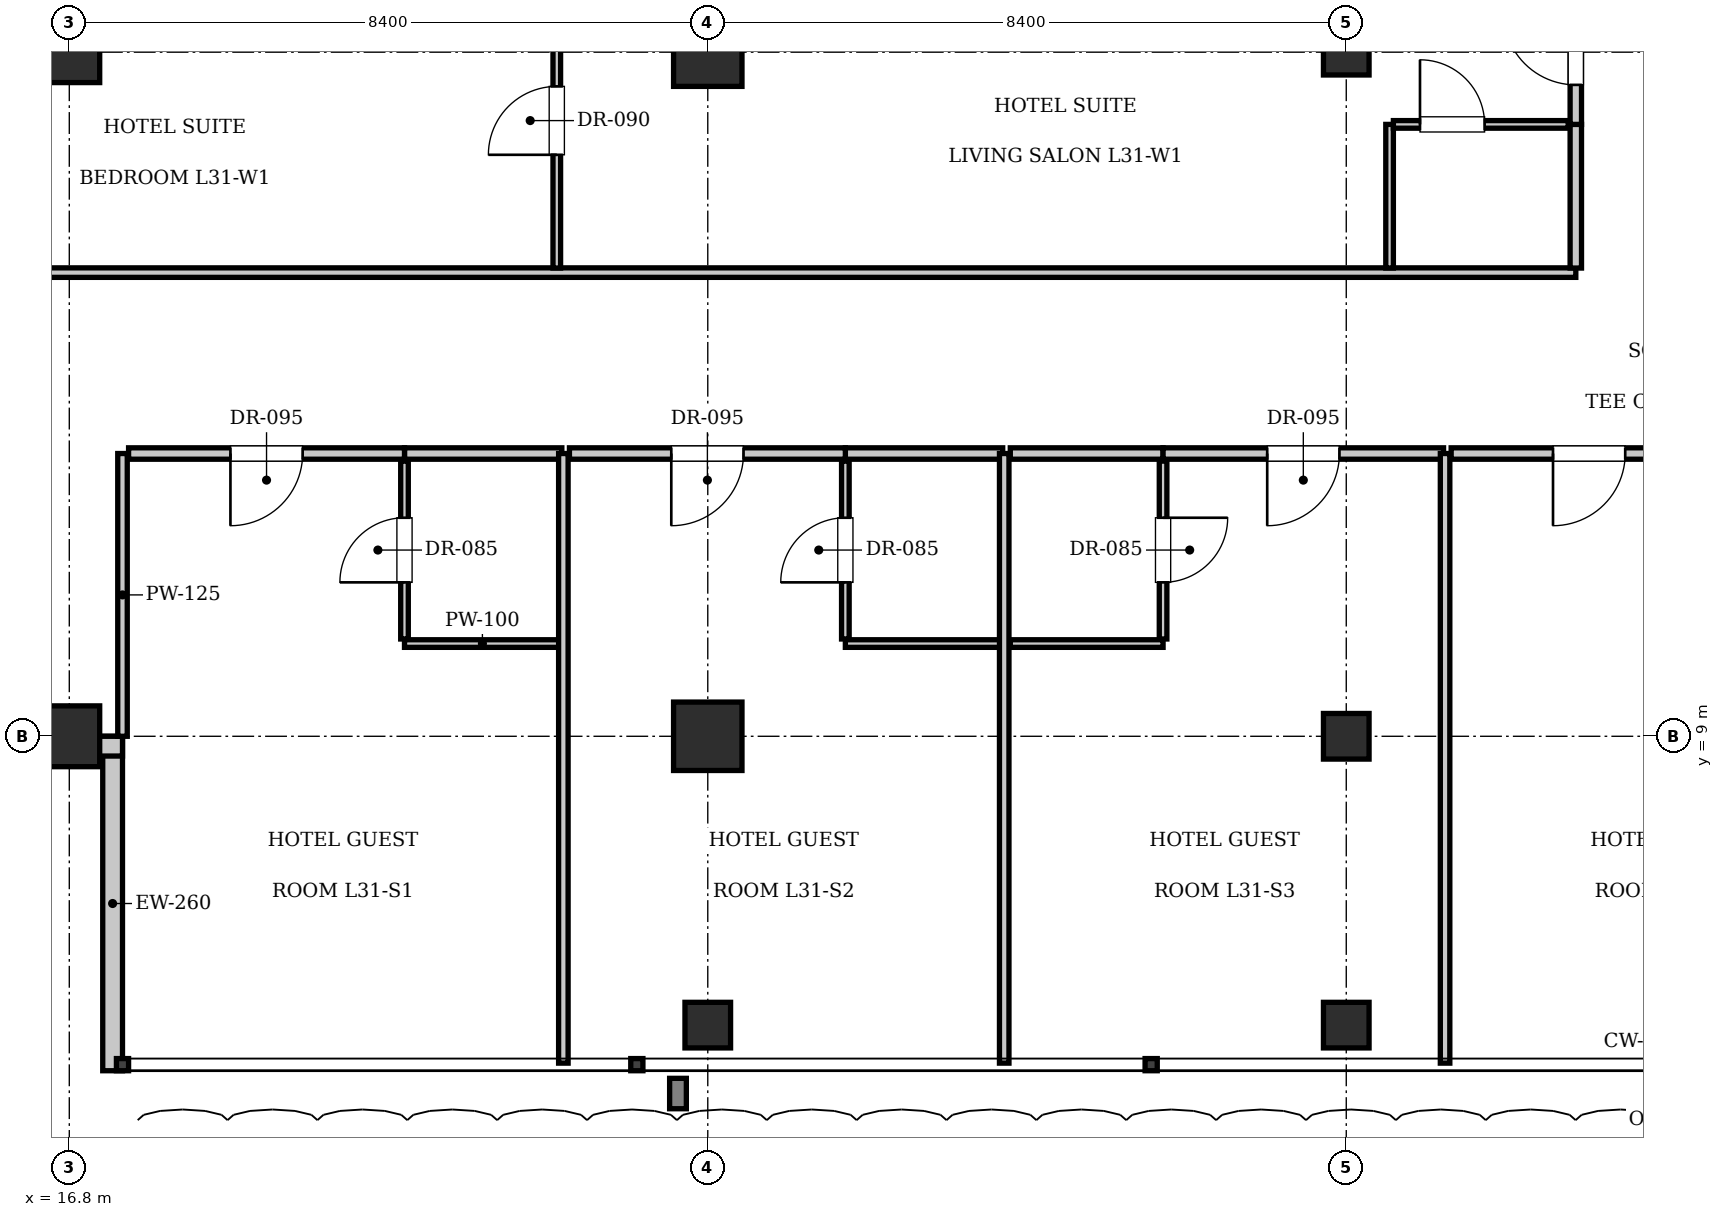
"""IFC4 building model, lengths in metres.
Left out: names, types, materials, properties, quantities, classifications, styles, units other than length and angle.
Written with IfcOpenShell. Run it as: python <this file> out.ifc"""

import sys

from ifc_helpers import new_model, si_unit, direction, frame, frame_2d, origin, origin_2d, place, context, subcontext, project, spatial, rectangle, i_section, extrude, element, fill, save


model = new_model("IFC4")
c1 = context("Model", 3, precision=1e-05, world=origin(), true_north=direction((0.0, 1.0)))
c2 = subcontext(c1, "Body", "Model", "MODEL_VIEW")
j1 = project(units=[si_unit("LENGTHUNIT", "METRE"), si_unit("PLANEANGLEUNIT", "RADIAN")], contexts=[c1])
p1 = place(None, origin())
s1 = spatial("IfcSite", under=j1, at=p1, CompositionType="ELEMENT")
p2 = place(p1, origin())
s2 = spatial("IfcBuilding", under=s1, at=p2, CompositionType="ELEMENT")
p3 = place(p2, frame((0.0, 0.0, 131.25)))
s3 = spatial("IfcBuildingStorey", under=s2, at=p3, CompositionType="ELEMENT", Elevation=131.25)
for number, where, z_axis, x_axis in (
    (1, (25.2, 18.0, 0.0), (0.0, 0.0, 1.0), (1.0, 0.0, 0.0)),
    (2, (25.2, 9.0, 0.0), (0.0, 0.0, 1.0), (1.0, 0.0, 0.0)),
):
    element("IfcColumn", number, at=place(p3, frame(where, z_axis=z_axis, x_axis=x_axis)), inside=s3, PredefinedType="COLUMN", context=c2, shape_type="SweptSolid", body=[
        extrude(rectangle(XDim=0.9, YDim=0.9, at=origin_2d()), origin(), (0.0, 0.0, 1.0), 3.85),
    ])
for number, where, z_axis, x_axis in (
    (3, (33.6, 9.0, 0.0), (0.0, 0.0, 1.0), (1.0, 0.0, 0.0)),
    (4, (33.6, 18.0, 0.0), (0.0, 0.0, 1.0), (1.0, 0.0, 0.0)),
):
    element("IfcColumn", number, at=place(p3, frame(where, z_axis=z_axis, x_axis=x_axis)), inside=s3, PredefinedType="COLUMN", context=c2, shape_type="SweptSolid", body=[
        extrude(i_section(OverallWidth=0.6, OverallDepth=0.6, WebThickness=0.025, FlangeThickness=0.038, at=origin_2d()), origin(), (0.0, 0.0, 1.0), 3.85),
    ])
for number, where, z_axis, x_axis in (
    (5, (16.8, 9.0, 0.0), (0.0, 0.0, 1.0), (1.0, 0.0, 0.0)),
    (6, (16.8, 18.0, 0.0), (0.0, 0.0, 1.0), (1.0, 0.0, 0.0)),
):
    element("IfcColumn", number, at=place(p3, frame(where, z_axis=z_axis, x_axis=x_axis)), inside=s3, PredefinedType="COLUMN", context=c2, shape_type="SweptSolid", body=[
        extrude(rectangle(XDim=0.8, YDim=0.8, at=origin_2d()), origin(), (0.0, 0.0, 1.0), 3.85),
    ])
for number, where, z_axis, x_axis in (
    (7, (25.2, 5.2, 0.0), (0.0, 0.0, 1.0), (1.0, 0.0, 0.0)),
    (8, (33.6, 5.2, 0.0), (0.0, 0.0, 1.0), (1.0, 0.0, 0.0)),
):
    element("IfcColumn", number, at=place(p3, frame(where, z_axis=z_axis, x_axis=x_axis)), inside=s3, PredefinedType="COLUMN", context=c2, shape_type="SweptSolid", body=[
        extrude(i_section(OverallWidth=0.6, OverallDepth=0.6, WebThickness=0.025, FlangeThickness=0.038, at=origin_2d()), origin(), (0.0, 0.0, 1.0), 3.85),
    ])
p4 = place(p3, frame((17.37, 4.6, 0.0), z_axis=(0.0, 0.0, 1.0), x_axis=(0.0, 1.0, 0.0)))
e9 = element("IfcWall", 9, at=p4, inside=s3, PredefinedType="SOLIDWALL", context=c2, shape_type="SweptSolid", body=[
    extrude(rectangle(XDim=4.4, YDim=0.26, at=frame_2d((2.2, 0.0))), origin(), (0.0, 0.0, 1.0), 3.61),
])
p5 = place(p3, frame((17.5, 8.87, 0.0), z_axis=(0.0, 0.0, 1.0), x_axis=(-1.0, 0.0, 0.0)))
e10 = element("IfcWall", 10, at=p5, inside=s3, PredefinedType="SOLIDWALL", context=c2, shape_type="SweptSolid", body=[
    extrude(rectangle(XDim=4.4, YDim=0.26, at=frame_2d((2.2, 0.0))), origin(), (0.0, 0.0, 1.0), 2.998),
])
p6 = place(p3, frame((17.5, 9.0, 0.0), z_axis=(0.0, 0.0, 1.0), x_axis=(0.0, 1.0, 0.0)))
e11 = element("IfcWall", 11, at=p6, inside=s3, PredefinedType="PARTITIONING", context=c2, shape_type="SweptSolid", body=[
    extrude(rectangle(XDim=3.72, YDim=0.125, at=frame_2d((1.86, 0.0))), origin(), (0.0, 0.0, 1.0), 3.61),
])
p7 = place(p3, frame((21.21, 12.72, 0.0), z_axis=(0.0, 0.0, 1.0), x_axis=(1.0, 0.0, 0.0)))
e12 = element("IfcWall", 12, at=p7, inside=s3, PredefinedType="PARTITIONING", context=c2, shape_type="SweptSolid", body=[
    extrude(rectangle(XDim=2.07, YDim=0.15, at=frame_2d((1.035, 0.0))), origin(), (0.0, 0.0, 1.0), 3.61),
])
p8 = place(p3, frame((21.21, 10.22, 0.0), z_axis=(0.0, 0.0, 1.0), x_axis=(1.0, 0.0, 0.0)))
e13 = element("IfcWall", 13, at=p8, inside=s3, PredefinedType="PARTITIONING", context=c2, shape_type="SweptSolid", body=[
    extrude(rectangle(XDim=2.05, YDim=0.1, at=frame_2d((1.025, 0.0))), origin(), (0.0, 0.0, 1.0), 3.61),
])
p9 = place(p3, frame((21.21, 10.28, 0.0), z_axis=(0.0, 0.0, 1.0), x_axis=(0.0, 1.0, 0.0)))
e14 = element("IfcWall", 14, at=p9, inside=s3, PredefinedType="PARTITIONING", context=c2, shape_type="SweptSolid", body=[
    extrude(rectangle(XDim=2.34, YDim=0.1, at=frame_2d((1.17, 0.0))), origin(), (0.0, 0.0, 1.0), 3.61),
])
p10 = place(p9, frame((0.745, 0.0, 0.0)))
e15 = element("IfcOpeningElement", 15, at=p10, cuts=e14, PredefinedType="OPENING", context=c2, shape_type="SweptSolid", body=[
    extrude(rectangle(XDim=0.85, YDim=2.1, at=frame_2d((0.425, 1.05))), frame((0.0, 0.06, 0.0), z_axis=(0.0, -1.0, 0.0), x_axis=(1.0, 0.0, 0.0)), (0.0, 0.0, 1.0), 0.12),
])
p11 = place(p3, frame((17.58, 12.72, 0.0), z_axis=(0.0, 0.0, 1.0), x_axis=(1.0, 0.0, 0.0)))
e16 = element("IfcWall", 16, at=p11, inside=s3, PredefinedType="PARTITIONING", context=c2, shape_type="SweptSolid", body=[
    extrude(rectangle(XDim=3.63, YDim=0.15, at=frame_2d((1.815, 0.0))), origin(), (0.0, 0.0, 1.0), 3.61),
])
p12 = place(p11, frame((1.34, 0.0, 0.0)))
e17 = element("IfcOpeningElement", 17, at=p12, cuts=e16, PredefinedType="OPENING", context=c2, shape_type="SweptSolid", body=[
    extrude(rectangle(XDim=0.95, YDim=2.15, at=frame_2d((0.475, 1.075))), frame((0.0, 0.085, 0.0), z_axis=(0.0, -1.0, 0.0), x_axis=(1.0, 0.0, 0.0)), (0.0, 0.0, 1.0), 0.17),
])
p13 = place(p3, frame((23.3, 4.7, 0.0), z_axis=(0.0, 0.0, 1.0), x_axis=(0.0, 1.0, 0.0)))
e18 = element("IfcWall", 18, at=p13, inside=s3, PredefinedType="PARTITIONING", context=c2, shape_type="SweptSolid", body=[
    extrude(rectangle(XDim=8.02, YDim=0.125, at=frame_2d((4.01, 0.0))), origin(), (0.0, 0.0, 1.0), 3.61),
])
p14 = place(p3, frame((27.01, 12.72, 0.0), z_axis=(0.0, 0.0, 1.0), x_axis=(1.0, 0.0, 0.0)))
e19 = element("IfcWall", 19, at=p14, inside=s3, PredefinedType="PARTITIONING", context=c2, shape_type="SweptSolid", body=[
    extrude(rectangle(XDim=2.07, YDim=0.15, at=frame_2d((1.035, 0.0))), origin(), (0.0, 0.0, 1.0), 3.61),
])
p15 = place(p3, frame((27.01, 10.22, 0.0), z_axis=(0.0, 0.0, 1.0), x_axis=(1.0, 0.0, 0.0)))
e20 = element("IfcWall", 20, at=p15, inside=s3, PredefinedType="PARTITIONING", context=c2, shape_type="SweptSolid", body=[
    extrude(rectangle(XDim=2.05, YDim=0.1, at=frame_2d((1.025, 0.0))), origin(), (0.0, 0.0, 1.0), 3.61),
])
p16 = place(p3, frame((27.01, 10.28, 0.0), z_axis=(0.0, 0.0, 1.0), x_axis=(0.0, 1.0, 0.0)))
e21 = element("IfcWall", 21, at=p16, inside=s3, PredefinedType="PARTITIONING", context=c2, shape_type="SweptSolid", body=[
    extrude(rectangle(XDim=2.34, YDim=0.1, at=frame_2d((1.17, 0.0))), origin(), (0.0, 0.0, 1.0), 3.61),
])
p17 = place(p16, frame((0.745, 0.0, 0.0)))
e22 = element("IfcOpeningElement", 22, at=p17, cuts=e21, PredefinedType="OPENING", context=c2, shape_type="SweptSolid", body=[
    extrude(rectangle(XDim=0.85, YDim=2.1, at=frame_2d((0.425, 1.05))), frame((0.0, 0.06, 0.0), z_axis=(0.0, -1.0, 0.0), x_axis=(1.0, 0.0, 0.0)), (0.0, 0.0, 1.0), 0.12),
])
p18 = place(p3, frame((23.38, 12.72, 0.0), z_axis=(0.0, 0.0, 1.0), x_axis=(1.0, 0.0, 0.0)))
e23 = element("IfcWall", 23, at=p18, inside=s3, PredefinedType="PARTITIONING", context=c2, shape_type="SweptSolid", body=[
    extrude(rectangle(XDim=3.63, YDim=0.15, at=frame_2d((1.815, 0.0))), origin(), (0.0, 0.0, 1.0), 3.61),
])
p19 = place(p18, frame((1.34, 0.0, 0.0)))
e24 = element("IfcOpeningElement", 24, at=p19, cuts=e23, PredefinedType="OPENING", context=c2, shape_type="SweptSolid", body=[
    extrude(rectangle(XDim=0.95, YDim=2.15, at=frame_2d((0.475, 1.075))), frame((0.0, 0.085, 0.0), z_axis=(0.0, -1.0, 0.0), x_axis=(1.0, 0.0, 0.0)), (0.0, 0.0, 1.0), 0.17),
])
p20 = place(p3, frame((29.1, 4.7, 0.0), z_axis=(0.0, 0.0, 1.0), x_axis=(0.0, 1.0, 0.0)))
e25 = element("IfcWall", 25, at=p20, inside=s3, PredefinedType="PARTITIONING", context=c2, shape_type="SweptSolid", body=[
    extrude(rectangle(XDim=8.02, YDim=0.125, at=frame_2d((4.01, 0.0))), origin(), (0.0, 0.0, 1.0), 3.61),
])
p21 = place(p3, frame((29.18, 12.72, 0.0), z_axis=(0.0, 0.0, 1.0), x_axis=(1.0, 0.0, 0.0)))
e26 = element("IfcWall", 26, at=p21, inside=s3, PredefinedType="PARTITIONING", context=c2, shape_type="SweptSolid", body=[
    extrude(rectangle(XDim=2.01, YDim=0.15, at=frame_2d((1.005, 0.0))), origin(), (0.0, 0.0, 1.0), 3.61),
])
p22 = place(p3, frame((29.18, 10.22, 0.0), z_axis=(0.0, 0.0, 1.0), x_axis=(1.0, 0.0, 0.0)))
e27 = element("IfcWall", 27, at=p22, inside=s3, PredefinedType="PARTITIONING", context=c2, shape_type="SweptSolid", body=[
    extrude(rectangle(XDim=2.01, YDim=0.1, at=frame_2d((1.005, 0.0))), origin(), (0.0, 0.0, 1.0), 3.61),
])
p23 = place(p3, frame((31.19, 10.28, 0.0), z_axis=(0.0, 0.0, 1.0), x_axis=(0.0, 1.0, 0.0)))
e28 = element("IfcWall", 28, at=p23, inside=s3, PredefinedType="PARTITIONING", context=c2, shape_type="SweptSolid", body=[
    extrude(rectangle(XDim=2.34, YDim=0.1, at=frame_2d((1.17, 0.0))), origin(), (0.0, 0.0, 1.0), 3.61),
])
p24 = place(p23, frame((0.745, 0.0, 0.0)))
e29 = element("IfcOpeningElement", 29, at=p24, cuts=e28, PredefinedType="OPENING", context=c2, shape_type="SweptSolid", body=[
    extrude(rectangle(XDim=0.85, YDim=2.1, at=frame_2d((0.425, 1.05))), frame((0.0, 0.06, 0.0), z_axis=(0.0, -1.0, 0.0), x_axis=(1.0, 0.0, 0.0)), (0.0, 0.0, 1.0), 0.12),
])
p25 = place(p3, frame((31.19, 12.72, 0.0), z_axis=(0.0, 0.0, 1.0), x_axis=(1.0, 0.0, 0.0)))
e30 = element("IfcWall", 30, at=p25, inside=s3, PredefinedType="PARTITIONING", context=c2, shape_type="SweptSolid", body=[
    extrude(rectangle(XDim=3.69, YDim=0.15, at=frame_2d((1.845, 0.0))), origin(), (0.0, 0.0, 1.0), 3.61),
])
p26 = place(p25, frame((1.37, 0.0, 0.0)))
e31 = element("IfcOpeningElement", 31, at=p26, cuts=e30, PredefinedType="OPENING", context=c2, shape_type="SweptSolid", body=[
    extrude(rectangle(XDim=0.95, YDim=2.15, at=frame_2d((0.475, 1.075))), frame((0.0, 0.085, 0.0), z_axis=(0.0, -1.0, 0.0), x_axis=(1.0, 0.0, 0.0)), (0.0, 0.0, 1.0), 0.17),
])
p27 = place(p3, frame((34.9, 4.7, 0.0), z_axis=(0.0, 0.0, 1.0), x_axis=(0.0, 1.0, 0.0)))
e32 = element("IfcWall", 32, at=p27, inside=s3, PredefinedType="PARTITIONING", context=c2, shape_type="SweptSolid", body=[
    extrude(rectangle(XDim=8.02, YDim=0.125, at=frame_2d((4.01, 0.0))), origin(), (0.0, 0.0, 1.0), 3.61),
])
p28 = place(p3, frame((34.98, 12.72, 0.0), z_axis=(0.0, 0.0, 1.0), x_axis=(1.0, 0.0, 0.0)))
e33 = element("IfcWall", 33, at=p28, inside=s3, PredefinedType="PARTITIONING", context=c2, shape_type="SweptSolid", body=[
    extrude(rectangle(XDim=3.63, YDim=0.15, at=frame_2d((1.815, 0.0))), origin(), (0.0, 0.0, 1.0), 3.61),
])
p29 = place(p28, frame((1.34, 0.0, 0.0)))
e34 = element("IfcOpeningElement", 34, at=p29, cuts=e33, PredefinedType="OPENING", context=c2, shape_type="SweptSolid", body=[
    extrude(rectangle(XDim=0.95, YDim=2.15, at=frame_2d((0.475, 1.075))), frame((0.0, 0.085, 0.0), z_axis=(0.0, -1.0, 0.0), x_axis=(1.0, 0.0, 0.0)), (0.0, 0.0, 1.0), 0.17),
])
p30 = place(p3, frame((13.2, 15.1, 0.0), z_axis=(0.0, 0.0, 1.0), x_axis=(1.0, 0.0, 0.0)))
e35 = element("IfcWall", 35, at=p30, inside=s3, PredefinedType="PARTITIONING", context=c2, shape_type="SweptSolid", body=[
    extrude(rectangle(XDim=23.42, YDim=0.125, at=frame_2d((11.71, 0.0))), origin(), (0.0, 0.0, 1.0), 3.61),
])
p31 = place(p3, frame((36.62, 15.16, 0.0), z_axis=(0.0, 0.0, 1.0), x_axis=(0.0, 1.0, 0.0)))
e36 = element("IfcWall", 36, at=p31, inside=s3, PredefinedType="PARTITIONING", context=c2, shape_type="SweptSolid", body=[
    extrude(rectangle(XDim=1.89, YDim=0.15, at=frame_2d((0.945, 0.0))), origin(), (0.0, 0.0, 1.0), 3.61),
])
p32 = place(p3, frame((36.62, 17.05, 0.0), z_axis=(0.0, 0.0, 1.0), x_axis=(0.0, 1.0, 0.0)))
e37 = element("IfcWall", 37, at=p32, inside=s3, PredefinedType="PARTITIONING", context=c2, shape_type="SweptSolid", body=[
    extrude(rectangle(XDim=1.99, YDim=0.15, at=frame_2d((0.995, 0.0))), origin(), (0.0, 0.0, 1.0), 3.61),
])
p33 = place(p32, frame((0.52, 0.0, 0.0)))
e38 = element("IfcOpeningElement", 38, at=p33, cuts=e37, PredefinedType="OPENING", context=c2, shape_type="SweptSolid", body=[
    extrude(rectangle(XDim=0.95, YDim=2.15, at=frame_2d((0.475, 1.075))), frame((0.0, 0.085, 0.0), z_axis=(0.0, -1.0, 0.0), x_axis=(1.0, 0.0, 0.0)), (0.0, 0.0, 1.0), 0.17),
])
p34 = place(p3, frame((34.17, 15.16, 0.0), z_axis=(0.0, 0.0, 1.0), x_axis=(0.0, 1.0, 0.0)))
e39 = element("IfcWall", 39, at=p34, inside=s3, PredefinedType="PARTITIONING", context=c2, shape_type="SweptSolid", body=[
    extrude(rectangle(XDim=1.89, YDim=0.1, at=frame_2d((0.945, 0.0))), origin(), (0.0, 0.0, 1.0), 3.61),
])
p35 = place(p3, frame((34.22, 17.05, 0.0), z_axis=(0.0, 0.0, 1.0), x_axis=(1.0, 0.0, 0.0)))
e40 = element("IfcWall", 40, at=p35, inside=s3, PredefinedType="PARTITIONING", context=c2, shape_type="SweptSolid", body=[
    extrude(rectangle(XDim=2.3, YDim=0.1, at=frame_2d((1.15, 0.0))), origin(), (0.0, 0.0, 1.0), 3.61),
])
p36 = place(p35, frame((0.35, 0.0, 0.0)))
e41 = element("IfcOpeningElement", 41, at=p36, cuts=e40, PredefinedType="OPENING", context=c2, shape_type="SweptSolid", body=[
    extrude(rectangle(XDim=0.85, YDim=2.1, at=frame_2d((0.425, 1.05))), frame((0.0, 0.06, 0.0), z_axis=(0.0, -1.0, 0.0), x_axis=(1.0, 0.0, 0.0)), (0.0, 0.0, 1.0), 0.12),
])
p37 = place(p3, frame((23.214, 15.16, 0.0), z_axis=(0.0, 0.0, 1.0), x_axis=(0.0, 1.0, 0.0)))
e42 = element("IfcWall", 42, at=p37, inside=s3, PredefinedType="PARTITIONING", context=c2, shape_type="SweptSolid", body=[
    extrude(rectangle(XDim=3.88, YDim=0.1, at=frame_2d((1.94, 0.0))), origin(), (0.0, 0.0, 1.0), 3.61),
])
p38 = place(p37, frame((1.49, 0.0, 0.0)))
e43 = element("IfcOpeningElement", 43, at=p38, cuts=e42, PredefinedType="OPENING", context=c2, shape_type="SweptSolid", body=[
    extrude(rectangle(XDim=0.9, YDim=2.1, at=frame_2d((0.45, 1.05))), frame((0.0, 0.06, 0.0), z_axis=(0.0, -1.0, 0.0), x_axis=(1.0, 0.0, 0.0)), (0.0, 0.0, 1.0), 0.12),
])
p39 = place(p10, origin())
e44 = element("IfcDoor", 44, at=p39, inside=s3, OperationType="SINGLE_SWING_LEFT", PredefinedType="DOOR", context=c2, shape_type="SweptSolid", body=[
    extrude(rectangle(XDim=0.85, YDim=2.1, at=frame_2d((0.425, 1.05))), frame((0.0, 0.025, 0.0), z_axis=(0.0, -1.0, 0.0), x_axis=(1.0, 0.0, 0.0)), (0.0, 0.0, 1.0), 0.05),
])
fill(e15, e44)
p40 = place(p12, frame((0.95, 0.0, 0.0), z_axis=(0.0, 0.0, 1.0), x_axis=(-1.0, 0.0, 0.0)))
e45 = element("IfcDoor", 45, at=p40, inside=s3, OperationType="SINGLE_SWING_RIGHT", PredefinedType="DOOR", context=c2, shape_type="SweptSolid", body=[
    extrude(rectangle(XDim=0.95, YDim=2.15, at=frame_2d((0.475, 1.075))), frame((0.0, 0.025, 0.0), z_axis=(0.0, -1.0, 0.0), x_axis=(1.0, 0.0, 0.0)), (0.0, 0.0, 1.0), 0.05),
])
fill(e17, e45)
p41 = place(p17, origin())
e46 = element("IfcDoor", 46, at=p41, inside=s3, OperationType="SINGLE_SWING_LEFT", PredefinedType="DOOR", context=c2, shape_type="SweptSolid", body=[
    extrude(rectangle(XDim=0.85, YDim=2.1, at=frame_2d((0.425, 1.05))), frame((0.0, 0.025, 0.0), z_axis=(0.0, -1.0, 0.0), x_axis=(1.0, 0.0, 0.0)), (0.0, 0.0, 1.0), 0.05),
])
fill(e22, e46)
p42 = place(p19, frame((0.95, 0.0, 0.0), z_axis=(0.0, 0.0, 1.0), x_axis=(-1.0, 0.0, 0.0)))
e47 = element("IfcDoor", 47, at=p42, inside=s3, OperationType="SINGLE_SWING_RIGHT", PredefinedType="DOOR", context=c2, shape_type="SweptSolid", body=[
    extrude(rectangle(XDim=0.95, YDim=2.15, at=frame_2d((0.475, 1.075))), frame((0.0, 0.025, 0.0), z_axis=(0.0, -1.0, 0.0), x_axis=(1.0, 0.0, 0.0)), (0.0, 0.0, 1.0), 0.05),
])
fill(e24, e47)
p43 = place(p24, frame((0.85, 0.0, 0.0), z_axis=(0.0, 0.0, 1.0), x_axis=(-1.0, 0.0, 0.0)))
e48 = element("IfcDoor", 48, at=p43, inside=s3, OperationType="SINGLE_SWING_LEFT", PredefinedType="DOOR", context=c2, shape_type="SweptSolid", body=[
    extrude(rectangle(XDim=0.85, YDim=2.1, at=frame_2d((0.425, 1.05))), frame((0.0, 0.025, 0.0), z_axis=(0.0, -1.0, 0.0), x_axis=(1.0, 0.0, 0.0)), (0.0, 0.0, 1.0), 0.05),
])
fill(e29, e48)
p44 = place(p26, frame((0.95, 0.0, 0.0), z_axis=(0.0, 0.0, 1.0), x_axis=(-1.0, 0.0, 0.0)))
e49 = element("IfcDoor", 49, at=p44, inside=s3, OperationType="SINGLE_SWING_RIGHT", PredefinedType="DOOR", context=c2, shape_type="SweptSolid", body=[
    extrude(rectangle(XDim=0.95, YDim=2.15, at=frame_2d((0.475, 1.075))), frame((0.0, 0.025, 0.0), z_axis=(0.0, -1.0, 0.0), x_axis=(1.0, 0.0, 0.0)), (0.0, 0.0, 1.0), 0.05),
])
fill(e31, e49)
p45 = place(p29, frame((0.95, 0.0, 0.0), z_axis=(0.0, 0.0, 1.0), x_axis=(-1.0, 0.0, 0.0)))
e50 = element("IfcDoor", 50, at=p45, inside=s3, OperationType="SINGLE_SWING_RIGHT", PredefinedType="DOOR", context=c2, shape_type="SweptSolid", body=[
    extrude(rectangle(XDim=0.95, YDim=2.15, at=frame_2d((0.475, 1.075))), frame((0.0, 0.025, 0.0), z_axis=(0.0, -1.0, 0.0), x_axis=(1.0, 0.0, 0.0)), (0.0, 0.0, 1.0), 0.05),
])
fill(e34, e50)
p46 = place(p36, origin())
e51 = element("IfcDoor", 51, at=p46, inside=s3, OperationType="SINGLE_SWING_LEFT", PredefinedType="DOOR", context=c2, shape_type="SweptSolid", body=[
    extrude(rectangle(XDim=0.85, YDim=2.1, at=frame_2d((0.425, 1.05))), frame((0.0, 0.025, 0.0), z_axis=(0.0, -1.0, 0.0), x_axis=(1.0, 0.0, 0.0)), (0.0, 0.0, 1.0), 0.05),
])
fill(e41, e51)
p47 = place(p33, origin())
e52 = element("IfcDoor", 52, at=p47, inside=s3, OperationType="SINGLE_SWING_RIGHT", PredefinedType="DOOR", context=c2, shape_type="SweptSolid", body=[
    extrude(rectangle(XDim=0.95, YDim=2.15, at=frame_2d((0.475, 1.075))), frame((0.0, 0.025, 0.0), z_axis=(0.0, -1.0, 0.0), x_axis=(1.0, 0.0, 0.0)), (0.0, 0.0, 1.0), 0.05),
])
fill(e38, e52)
p48 = place(p38, origin())
e53 = element("IfcDoor", 53, at=p48, inside=s3, OperationType="SINGLE_SWING_LEFT", PredefinedType="DOOR", context=c2, shape_type="SweptSolid", body=[
    extrude(rectangle(XDim=0.9, YDim=2.1, at=frame_2d((0.45, 1.05))), frame((0.0, 0.025, 0.0), z_axis=(0.0, -1.0, 0.0), x_axis=(1.0, 0.0, 0.0)), (0.0, 0.0, 1.0), 0.05),
])
fill(e43, e53)
save(model, sys.argv[1])
